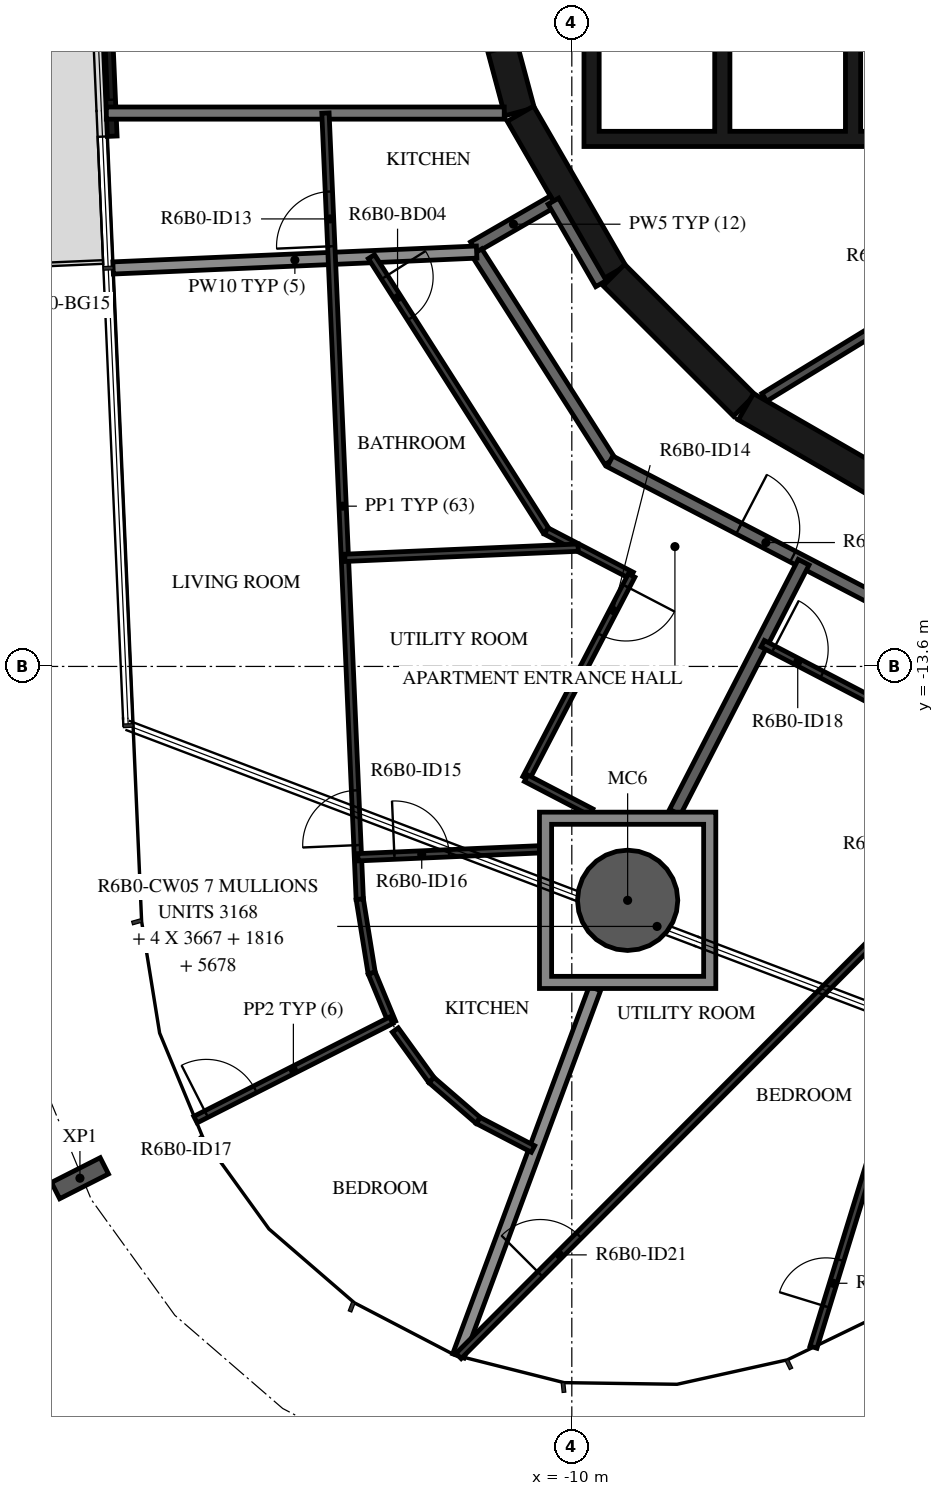
"""IFC4 building model, lengths in metres.
Left out: names, types, materials, properties, quantities, classifications, styles, units other than length and angle.
Written with IfcOpenShell. Run it as: python <this file> out.ifc"""

import sys

from ifc_helpers import new_model, si_unit, direction, frame, frame_2d, origin, origin_2d, place, context, subcontext, project, spatial, polyline, rectangle, hollow_circle, i_section, outline, extrude, element, fill, save


model = new_model("IFC4")
c1 = context("Model", 3, precision=1e-05, world=origin(), true_north=direction((0.0, 1.0)))
c2 = subcontext(c1, "Body", "Model", "MODEL_VIEW")
j1 = project(units=[si_unit("LENGTHUNIT", "METRE"), si_unit("PLANEANGLEUNIT", "RADIAN")], contexts=[c1])
p1 = place(None, origin())
s1 = spatial("IfcSite", under=j1, at=p1, CompositionType="ELEMENT")
p2 = place(p1, origin())
s2 = spatial("IfcBuilding", under=s1, at=p2, CompositionType="ELEMENT")
p3 = place(p2, frame((0.0, 0.0, 240.7)))
s3 = spatial("IfcBuildingStorey", under=s2, at=p3, CompositionType="ELEMENT", Elevation=240.7)
p4 = place(p3, frame((-9.082, -17.446, -0.38), z_axis=(0.0, 0.0, 1.0), x_axis=(1.0, 0.0, 0.0)))
e1 = element("IfcColumn", 1, at=p4, inside=s3, PredefinedType="COLUMN", context=c2, shape_type="SweptSolid", body=[
    extrude(hollow_circle(Radius=0.825, WallThickness=0.04, at=origin_2d()), origin(), (0.0, 0.0, 1.0), 3.5),
])
p5 = place(p3, frame((-18.089, -22.016, -0.38), z_axis=(0.0, 0.0, 1.0), x_axis=(-0.452473836659, 0.89177767809, 0.0)))
e2 = element("IfcColumn", 2, at=p5, inside=s3, PredefinedType="COLUMN", context=c2, shape_type="SweptSolid", body=[
    extrude(i_section(OverallWidth=0.3, OverallDepth=0.9, WebThickness=0.019, FlangeThickness=0.035, FilletRadius=0.03, at=origin_2d()), origin(), (0.0, 0.0, 1.0), 3.5),
])
p6 = place(p3, frame((-17.698, -1.684, 0.0), z_axis=(0.0, 0.0, 1.0), x_axis=(0.043639181999, -0.999047357133, 0.0)))
e3 = element("IfcWall", 3, at=p6, inside=s3, PredefinedType="STANDARD", context=c2, shape_type="SweptSolid", body=[
    extrude(rectangle(XDim=3.2, YDim=0.16, at=frame_2d((1.6, 0.0))), origin(), (0.0, 0.0, 1.0), 3.12),
])
p7 = place(p6, frame((0.2, 0.0, 0.0)))
e4 = element("IfcOpeningElement", 4, at=p7, cuts=e3, PredefinedType="OPENING", context=c2, shape_type="SweptSolid", body=[
    extrude(rectangle(XDim=2.4, YDim=2.4, at=frame_2d((1.2, 1.2))), frame((0.0, 0.09, 0.0), z_axis=(0.0, -1.0, 0.0), x_axis=(1.0, 0.0, 0.0)), (0.0, 0.0, 1.0), 0.18),
])
p8 = place(p3, frame((-11.643, -1.55, 0.0), z_axis=(0.0, 0.0, 1.0), x_axis=(0.258734743916, -0.965948410781, 0.0)))
e5 = element("IfcWall", 5, at=p8, inside=s3, PredefinedType="SHEAR", context=c2, shape_type="SweptSolid", body=[
    extrude(rectangle(XDim=3.033, YDim=0.5, at=frame_2d((1.516, 0.0))), origin(), (0.0, 0.0, 1.0), 3.12),
])
p9 = place(p8, frame((1.066, 0.0, 0.0)))
e6 = element("IfcOpeningElement", 6, at=p9, cuts=e5, PredefinedType="OPENING", context=c2, shape_type="SweptSolid", body=[
    extrude(rectangle(XDim=0.9, YDim=2.1, at=frame_2d((0.45, 1.05))), frame((0.0, 0.26, 0.0), z_axis=(0.0, -1.0, 0.0), x_axis=(1.0, 0.0, 0.0)), (0.0, 0.0, 1.0), 0.52),
])
p10 = place(p3, frame((-10.845, -4.51, 0.0), z_axis=(0.0, 0.0, 1.0), x_axis=(0.500087131594, -0.865975092491, 0.0)))
e7 = element("IfcWall", 7, at=p10, inside=s3, PredefinedType="SHEAR", context=c2, shape_type="SweptSolid", body=[
    extrude(rectangle(XDim=3.033, YDim=0.5, at=frame_2d((1.516, 0.0))), origin(), (0.0, 0.0, 1.0), 3.12),
])
p11 = place(p3, frame((-9.308, -7.164, 0.0), z_axis=(0.0, 0.0, 1.0), x_axis=(0.707106781187, -0.707106781187, 0.0)))
e8 = element("IfcWall", 8, at=p11, inside=s3, PredefinedType="SHEAR", context=c2, shape_type="SweptSolid", body=[
    extrude(rectangle(XDim=3.032, YDim=0.5, at=frame_2d((1.516, 0.0))), origin(), (0.0, 0.0, 1.0), 3.12),
])
p12 = place(p3, frame((-7.137, -9.329, 0.0), z_axis=(0.0, 0.0, 1.0), x_axis=(0.865975092491, -0.500087131594, 0.0)))
e9 = element("IfcWall", 9, at=p12, inside=s3, PredefinedType="SHEAR", context=c2, shape_type="SweptSolid", body=[
    extrude(rectangle(XDim=3.033, YDim=0.5, at=frame_2d((1.516, 0.0))), origin(), (0.0, 0.0, 1.0), 3.12),
])
p13 = place(p3, origin())
e10 = element("IfcWall", 10, at=p13, inside=s3, PredefinedType="SHEAR", context=c2, shape_type="SweptSolid", body=[
    extrude(outline(polyline([(9.8, -5.05), (9.8, -4.8), (9.8, -1.9), (9.55, -1.9), (9.55, -4.8), (7.65, -4.8), (7.65, -1.9), (7.4, -1.9), (7.4, -4.8), (5.5, -4.8), (5.5, -1.9), (5.25, -1.9), (5.25, -4.8), (3.35, -4.8), (3.35, -1.9), (3.1, -1.9), (3.1, -4.8), (1.2, -4.8), (1.2, -1.9), (0.95, -1.9), (0.95, -4.8), (-0.95, -4.8), (-0.95, -1.9), (-1.2, -1.9), (-1.2, -4.8), (-3.1, -4.8), (-3.1, -1.9), (-3.35, -1.9), (-3.35, -4.8), (-5.25, -4.8), (-5.25, -1.9), (-5.5, -1.9), (-5.5, -4.8), (-7.4, -4.8), (-7.4, -1.9), (-7.65, -1.9), (-7.65, -4.8), (-9.55, -4.8), (-9.55, -1.9), (-9.8, -1.9), (-9.8, -4.8), (-9.8, -5.05), (9.8, -5.05)])), origin(), (0.0, 0.0, 1.0), 3.12),
])
p14 = place(p3, frame((-2.451, -6.495, 0.0), z_axis=(0.0, 0.0, 1.0), x_axis=(-0.853250115418, -0.521501908471, 0.0)))
e11 = element("IfcWall", 11, at=p14, inside=s3, PredefinedType="PARTITIONING", context=c2, shape_type="SweptSolid", body=[
    extrude(rectangle(XDim=5.137, YDim=0.15, at=frame_2d((2.569, 0.0))), origin(), (0.0, 0.0, 1.0), 3.12),
])
p15 = place(p14, frame((2.119, 0.0, 0.0)))
e12 = element("IfcOpeningElement", 12, at=p15, cuts=e11, PredefinedType="OPENING", context=c2, shape_type="SweptSolid", body=[
    extrude(rectangle(XDim=0.9, YDim=2.1, at=frame_2d((0.45, 1.05))), frame((0.0, 0.085, 0.0), z_axis=(0.0, -1.0, 0.0), x_axis=(1.0, 0.0, 0.0)), (0.0, 0.0, 1.0), 0.17),
])
p16 = place(p3, frame((-10.303, -5.949, 0.0), z_axis=(0.0, 0.0, 1.0), x_axis=(-0.866043382451, -0.499968858743, 0.0)))
e13 = element("IfcWall", 13, at=p16, inside=s3, PredefinedType="STANDARD", context=c2, shape_type="SweptSolid", body=[
    extrude(rectangle(XDim=1.515, YDim=0.2, at=frame_2d((0.758, 0.0))), origin(), (0.0, 0.0, 1.0), 3.12),
])
p17 = place(p3, frame((-9.52, -7.305, 0.0), z_axis=(0.0, 0.0, 1.0), x_axis=(-0.500028278809, 0.866009076391, 0.0)))
e14 = element("IfcWall", 14, at=p17, inside=s3, PredefinedType="STANDARD", context=c2, shape_type="SweptSolid", body=[
    extrude(rectangle(XDim=1.566, YDim=0.2, at=frame_2d((0.783, 0.0))), origin(), (0.0, 0.0, 1.0), 3.12),
])
p18 = place(p3, frame((-11.565, -6.786, 0.0), z_axis=(0.0, 0.0, 1.0), x_axis=(0.537297327359, -0.843392898958, 0.0)))
e15 = element("IfcWall", 15, at=p18, inside=s3, PredefinedType="STANDARD", context=c2, shape_type="SweptSolid", body=[
    extrude(rectangle(XDim=4.081, YDim=0.2, at=frame_2d((2.041, 0.0))), origin(), (0.0, 0.0, 1.0), 3.12),
])
p19 = place(p3, frame((-9.372, -10.228, 0.0), z_axis=(0.0, 0.0, 1.0), x_axis=(0.887005184532, -0.461759464021, 0.0)))
e16 = element("IfcWall", 16, at=p19, inside=s3, PredefinedType="STANDARD", context=c2, shape_type="SweptSolid", body=[
    extrude(rectangle(XDim=7.181, YDim=0.2, at=frame_2d((3.591, 0.0))), origin(), (0.0, 0.0, 1.0), 3.12),
])
p20 = place(p19, frame((2.391, 0.0, 0.0)))
e17 = element("IfcOpeningElement", 17, at=p20, cuts=e16, PredefinedType="OPENING", context=c2, shape_type="SweptSolid", body=[
    extrude(rectangle(XDim=1.0, YDim=2.1, at=frame_2d((0.5, 1.05))), frame((0.0, 0.11, 0.0), z_axis=(0.0, -1.0, 0.0), x_axis=(1.0, 0.0, 0.0)), (0.0, 0.0, 1.0), 0.22),
])
p21 = place(p3, frame((-17.655, -4.5, 0.0), z_axis=(0.0, 0.0, 1.0), x_axis=(1.0, 0.0, 0.0)))
e18 = element("IfcWall", 18, at=p21, inside=s3, PredefinedType="STANDARD", context=c2, shape_type="SweptSolid", body=[
    extrude(rectangle(XDim=6.543, YDim=0.2, at=frame_2d((3.272, 0.0))), origin(), (0.0, 0.0, 1.0), 3.12),
])
p22 = place(p3, frame((-17.544, -7.047, 0.0), z_axis=(0.0, 0.0, 1.0), x_axis=(0.999046743906, 0.043653218555, 0.0)))
e19 = element("IfcWall", 19, at=p22, inside=s3, PredefinedType="STANDARD", context=c2, shape_type="SweptSolid", body=[
    extrude(rectangle(XDim=5.984, YDim=0.2, at=frame_2d((2.992, 0.0))), origin(), (0.0, 0.0, 1.0), 2.73),
])
p23 = place(p3, frame((-8.303, -15.996, 0.0), z_axis=(0.0, 0.0, 1.0), x_axis=(0.457702371186, 0.889105471477, 0.0)))
e20 = element("IfcWall", 20, at=p23, inside=s3, PredefinedType="STANDARD", context=c2, shape_type="SweptSolid", body=[
    extrude(rectangle(XDim=4.623, YDim=0.2, at=frame_2d((2.312, 0.0))), origin(), (0.0, 0.0, 1.0), 3.12),
])
p24 = place(p3, frame((-11.865, -24.939, 0.0), z_axis=(0.0, 0.0, 1.0), x_axis=(0.348245485283, 0.937403372076, 0.0)))
e21 = element("IfcWall", 21, at=p24, inside=s3, PredefinedType="STANDARD", context=c2, shape_type="SweptSolid", body=[
    extrude(rectangle(XDim=6.446, YDim=0.2, at=frame_2d((3.223, 0.0))), origin(), (0.0, 0.0, 1.0), 2.73),
])
p25 = place(p3, frame((-13.487, -17.429, 0.0), z_axis=(0.0, 0.0, 1.0), x_axis=(-0.043617336945, 0.999048311103, 0.0)))
e22 = element("IfcWall", 22, at=p25, inside=s3, PredefinedType="PARTITIONING", context=c2, shape_type="SweptSolid", body=[
    extrude(rectangle(XDim=12.941, YDim=0.12, at=frame_2d((6.47, 0.0))), origin(), (0.0, 0.0, 1.0), 3.12),
])
p26 = place(p25, frame((10.749, 0.0, 0.0)))
e23 = element("IfcOpeningElement", 23, at=p26, cuts=e22, PredefinedType="OPENING", context=c2, shape_type="SweptSolid", body=[
    extrude(rectangle(XDim=0.9, YDim=2.1, at=frame_2d((0.45, 1.05))), frame((0.0, 0.07, 0.0), z_axis=(0.0, -1.0, 0.0), x_axis=(1.0, 0.0, 0.0)), (0.0, 0.0, 1.0), 0.14),
])
p27 = place(p25, frame((0.892, 0.0, 0.0)))
e24 = element("IfcOpeningElement", 24, at=p27, cuts=e22, PredefinedType="OPENING", context=c2, shape_type="SweptSolid", body=[
    extrude(rectangle(XDim=0.9, YDim=2.1, at=frame_2d((0.45, 1.05))), frame((0.0, 0.07, 0.0), z_axis=(0.0, -1.0, 0.0), x_axis=(1.0, 0.0, 0.0)), (0.0, 0.0, 1.0), 0.14),
])
p28 = place(p3, frame((-13.295, -6.862, 0.0), z_axis=(0.0, 0.0, 1.0), x_axis=(0.537285929223, -0.84340016022, 0.0)))
e25 = element("IfcWall", 25, at=p28, inside=s3, PredefinedType="PARTITIONING", context=c2, shape_type="SweptSolid", body=[
    extrude(rectangle(XDim=5.349, YDim=0.12, at=frame_2d((2.675, 0.0))), origin(), (0.0, 0.0, 1.0), 3.12),
])
p29 = place(p28, frame((0.4, 0.0, 0.0)))
e26 = element("IfcOpeningElement", 26, at=p29, cuts=e25, PredefinedType="OPENING", context=c2, shape_type="SweptSolid", body=[
    extrude(rectangle(XDim=0.8, YDim=2.1, at=frame_2d((0.4, 1.05))), frame((0.0, 0.07, 0.0), z_axis=(0.0, -1.0, 0.0), x_axis=(1.0, 0.0, 0.0)), (0.0, 0.0, 1.0), 0.14),
])
p30 = place(p3, frame((-10.421, -11.373, 0.0), z_axis=(0.0, 0.0, 1.0), x_axis=(0.887065333052, -0.461643904864, 0.0)))
e27 = element("IfcWall", 27, at=p30, inside=s3, PredefinedType="PARTITIONING", context=c2, shape_type="SweptSolid", body=[
    extrude(rectangle(XDim=1.584, YDim=0.12, at=frame_2d((0.792, 0.0))), origin(), (0.0, 0.0, 1.0), 3.12),
])
p31 = place(p3, frame((-9.016, -12.104, 0.0), z_axis=(0.0, 0.0, 1.0), x_axis=(-0.4617534789, -0.887008300256, 0.0)))
e28 = element("IfcWall", 28, at=p31, inside=s3, PredefinedType="PARTITIONING", context=c2, shape_type="SweptSolid", body=[
    extrude(rectangle(XDim=3.759, YDim=0.12, at=frame_2d((1.88, 0.0))), origin(), (0.0, 0.0, 1.0), 3.12),
])
p32 = place(p31, frame((0.2, 0.0, 0.0)))
e29 = element("IfcOpeningElement", 29, at=p32, cuts=e28, PredefinedType="OPENING", context=c2, shape_type="SweptSolid", body=[
    extrude(rectangle(XDim=0.9, YDim=2.1, at=frame_2d((0.45, 1.05))), frame((0.0, 0.07, 0.0), z_axis=(0.0, -1.0, 0.0), x_axis=(1.0, 0.0, 0.0)), (0.0, 0.0, 1.0), 0.14),
])
p33 = place(p3, frame((-10.752, -15.439, 0.0), z_axis=(0.0, 0.0, 1.0), x_axis=(0.887031383626, -0.461709134048, 0.0)))
e30 = element("IfcWall", 30, at=p33, inside=s3, PredefinedType="PARTITIONING", context=c2, shape_type="SweptSolid", body=[
    extrude(rectangle(XDim=1.208, YDim=0.12, at=frame_2d((0.604, 0.0))), origin(), (0.0, 0.0, 1.0), 3.12),
])
p34 = place(p3, frame((-13.732, -11.814, 0.0), z_axis=(0.0, 0.0, 1.0), x_axis=(0.999048344587, 0.043616569999, 0.0)))
e31 = element("IfcWall", 31, at=p34, inside=s3, PredefinedType="PARTITIONING", context=c2, shape_type="SweptSolid", body=[
    extrude(rectangle(XDim=3.84, YDim=0.12, at=frame_2d((1.92, 0.0))), origin(), (0.0, 0.0, 1.0), 3.12),
])
p35 = place(p3, frame((-12.954, -19.456, 0.0), z_axis=(0.0, 0.0, 1.0), x_axis=(-0.382807777256, 0.923828017367, 0.0)))
e32 = element("IfcWall", 32, at=p35, inside=s3, PredefinedType="PARTITIONING", context=c2, shape_type="SweptSolid", body=[
    extrude(rectangle(XDim=0.883, YDim=0.12, at=frame_2d((0.441, 0.0))), origin(), (0.0, 0.0, 1.0), 3.12),
])
p36 = place(p3, frame((-13.292, -18.64, 0.0), z_axis=(0.0, 0.0, 1.0), x_axis=(-0.159363796836, 0.98721992497, 0.0)))
e33 = element("IfcWall", 33, at=p36, inside=s3, PredefinedType="PARTITIONING", context=c2, shape_type="SweptSolid", body=[
    extrude(rectangle(XDim=1.227, YDim=0.12, at=frame_2d((0.614, 0.0))), origin(), (0.0, 0.0, 1.0), 3.12),
])
p37 = place(p3, frame((-16.189, -21.052, 0.0), z_axis=(0.0, 0.0, 1.0), x_axis=(0.891801938239, 0.452426019316, 0.0)))
e34 = element("IfcWall", 34, at=p37, inside=s3, PredefinedType="PARTITIONING", context=c2, shape_type="SweptSolid", body=[
    extrude(rectangle(XDim=3.611, YDim=0.12, at=frame_2d((1.805, 0.0))), origin(), (0.0, 0.0, 1.0), 2.73),
])
p38 = place(p37, frame((0.2, 0.0, 0.0)))
e35 = element("IfcOpeningElement", 35, at=p38, cuts=e34, PredefinedType="OPENING", context=c2, shape_type="SweptSolid", body=[
    extrude(rectangle(XDim=0.9, YDim=2.1, at=frame_2d((0.45, 1.05))), frame((0.0, 0.07, 0.0), z_axis=(0.0, -1.0, 0.0), x_axis=(1.0, 0.0, 0.0)), (0.0, 0.0, 1.0), 0.14),
])
p39 = place(p3, frame((-13.517, -16.738, 0.0), z_axis=(0.0, 0.0, 1.0), x_axis=(0.999047660155, 0.043632244256, 0.0)))
e36 = element("IfcWall", 36, at=p39, inside=s3, PredefinedType="PARTITIONING", context=c2, shape_type="SweptSolid", body=[
    extrude(rectangle(XDim=2.988, YDim=0.12, at=frame_2d((1.494, 0.0))), origin(), (0.0, 0.0, 1.0), 3.12),
])
p40 = place(p39, frame((0.6, 0.0, 0.0)))
e37 = element("IfcOpeningElement", 37, at=p40, cuts=e36, PredefinedType="OPENING", context=c2, shape_type="SweptSolid", body=[
    extrude(rectangle(XDim=0.9, YDim=2.1, at=frame_2d((0.45, 1.05))), frame((0.0, 0.07, 0.0), z_axis=(0.0, -1.0, 0.0), x_axis=(1.0, 0.0, 0.0)), (0.0, 0.0, 1.0), 0.14),
])
for number, where, z_axis, x_axis in (
    (38, (-12.903, -19.579, 0.0), (0.0, 0.0, 1.0), (0.585, -0.811, 0.0)),
    (39, (-12.308, -20.402, 0.0), (0.0, 0.0, 1.0), (0.757, -0.654, 0.0)),
    (40, (-11.539, -21.067, 0.0), (0.0, 0.0, 1.0), (0.887, -0.462, 0.0)),
):
    element("IfcWall", number, at=place(p3, frame(where, z_axis=z_axis, x_axis=x_axis)), inside=s3, PredefinedType="PARTITIONING", context=c2, shape_type="SweptSolid", body=[
        extrude(rectangle(XDim=1.016, YDim=0.12, at=frame_2d((0.508, 0.0))), origin(), (0.0, 0.0, 1.0), 3.12),
    ])
p41 = place(p3, frame((-6.861, -13.226, 0.0), z_axis=(0.0, 0.0, 1.0), x_axis=(0.887010791097, -0.461748694073, 0.0)))
e41 = element("IfcWall", 41, at=p41, inside=s3, PredefinedType="PARTITIONING", context=c2, shape_type="SweptSolid", body=[
    extrude(rectangle(XDim=3.727, YDim=0.12, at=frame_2d((1.864, 0.0))), origin(), (0.0, 0.0, 1.0), 3.12),
])
p42 = place(p41, frame((0.2, 0.0, 0.0)))
e42 = element("IfcOpeningElement", 42, at=p42, cuts=e41, PredefinedType="OPENING", context=c2, shape_type="SweptSolid", body=[
    extrude(rectangle(XDim=0.9, YDim=2.1, at=frame_2d((0.45, 1.05))), frame((0.0, 0.07, 0.0), z_axis=(0.0, -1.0, 0.0), x_axis=(1.0, 0.0, 0.0)), (0.0, 0.0, 1.0), 0.14),
])
p43 = place(p3, frame((-11.862, -24.94, 0.0), z_axis=(0.0, 0.0, 1.0), x_axis=(0.70663293894, 0.707580306117, 0.0)))
e43 = element("IfcWall", 43, at=p43, inside=s3, PredefinedType="PARTITIONING", context=c2, shape_type="SweptSolid", body=[
    extrude(rectangle(XDim=11.854, YDim=0.12, at=frame_2d((5.927, 0.0))), origin(), (0.0, 0.0, 1.0), 3.12),
])
p44 = place(p43, frame((1.9, 0.0, 0.0)))
e44 = element("IfcOpeningElement", 44, at=p44, cuts=e43, PredefinedType="OPENING", context=c2, shape_type="SweptSolid", body=[
    extrude(rectangle(XDim=0.9, YDim=2.1, at=frame_2d((0.45, 1.05))), frame((0.0, 0.07, 0.0), z_axis=(0.0, -1.0, 0.0), x_axis=(1.0, 0.0, 0.0)), (0.0, 0.0, 1.0), 0.14),
])
p45 = place(p3, frame((-6.026, -24.795, 0.0), z_axis=(0.0, 0.0, 1.0), x_axis=(0.294501505058, 0.955651015548, 0.0)))
e45 = element("IfcWall", 45, at=p45, inside=s3, PredefinedType="PARTITIONING", context=c2, shape_type="SweptSolid", body=[
    extrude(rectangle(XDim=8.626, YDim=0.12, at=frame_2d((4.313, 0.0))), origin(), (0.0, 0.0, 1.0), 3.12),
])
p46 = place(p45, frame((0.7, 0.0, 0.0)))
e46 = element("IfcOpeningElement", 46, at=p46, cuts=e45, PredefinedType="OPENING", context=c2, shape_type="SweptSolid", body=[
    extrude(rectangle(XDim=0.8, YDim=2.1, at=frame_2d((0.4, 1.05))), frame((0.0, 0.07, 0.0), z_axis=(0.0, -1.0, 0.0), x_axis=(1.0, 0.0, 0.0)), (0.0, 0.0, 1.0), 0.14),
])
p47 = place(p3, origin())
e47 = element("IfcWall", 47, at=p47, inside=s3, PredefinedType="STANDARD", context=c2, shape_type="SweptSolid", body=[
    extrude(outline(polyline([(-7.632, -15.996), (-7.632, -18.896), (-10.532, -18.896), (-10.532, -15.996), (-7.632, -15.996)]), holes=[polyline([(-10.332, -18.696), (-7.832, -18.696), (-7.832, -16.196), (-10.332, -16.196), (-10.332, -18.696)])]), origin(), (0.0, 0.0, 1.0), 3.12),
])
p48 = place(p7, origin())
e48 = element("IfcDoor", 48, at=p48, inside=s3, OperationType="DOUBLE_DOOR_SLIDING", PredefinedType="DOOR", context=c2, shape_type="SweptSolid", body=[
    extrude(rectangle(XDim=2.4, YDim=2.4, at=frame_2d((1.2, 1.2))), frame((0.0, 0.025, 0.0), z_axis=(0.0, -1.0, 0.0), x_axis=(1.0, 0.0, 0.0)), (0.0, 0.0, 1.0), 0.05),
])
fill(e4, e48)
p49 = place(p26, origin())
e49 = element("IfcDoor", 49, at=p49, inside=s3, OperationType="SINGLE_SWING_LEFT", PredefinedType="DOOR", context=c2, shape_type="SweptSolid", body=[
    extrude(rectangle(XDim=0.9, YDim=2.1, at=frame_2d((0.45, 1.05))), frame((0.0, 0.025, 0.0), z_axis=(0.0, -1.0, 0.0), x_axis=(1.0, 0.0, 0.0)), (0.0, 0.0, 1.0), 0.05),
])
fill(e23, e49)
p50 = place(p20, origin())
e50 = element("IfcDoor", 50, at=p50, inside=s3, OperationType="SINGLE_SWING_RIGHT", PredefinedType="DOOR", context=c2, shape_type="SweptSolid", body=[
    extrude(rectangle(XDim=1.0, YDim=2.1, at=frame_2d((0.5, 1.05))), frame((0.0, 0.025, 0.0), z_axis=(0.0, -1.0, 0.0), x_axis=(1.0, 0.0, 0.0)), (0.0, 0.0, 1.0), 0.05),
])
fill(e17, e50)
p51 = place(p29, origin())
e51 = element("IfcDoor", 51, at=p51, inside=s3, OperationType="SINGLE_SWING_RIGHT", PredefinedType="DOOR", context=c2, shape_type="SweptSolid", body=[
    extrude(rectangle(XDim=0.8, YDim=2.1, at=frame_2d((0.4, 1.05))), frame((0.0, 0.025, 0.0), z_axis=(0.0, -1.0, 0.0), x_axis=(1.0, 0.0, 0.0)), (0.0, 0.0, 1.0), 0.05),
])
fill(e26, e51)
p52 = place(p32, origin())
e52 = element("IfcDoor", 52, at=p52, inside=s3, OperationType="SINGLE_SWING_RIGHT", PredefinedType="DOOR", context=c2, shape_type="SweptSolid", body=[
    extrude(rectangle(XDim=0.9, YDim=2.1, at=frame_2d((0.45, 1.05))), frame((0.0, 0.025, 0.0), z_axis=(0.0, -1.0, 0.0), x_axis=(1.0, 0.0, 0.0)), (0.0, 0.0, 1.0), 0.05),
])
fill(e29, e52)
p53 = place(p27, origin())
e53 = element("IfcDoor", 53, at=p53, inside=s3, OperationType="SINGLE_SWING_RIGHT", PredefinedType="DOOR", context=c2, shape_type="SweptSolid", body=[
    extrude(rectangle(XDim=0.9, YDim=2.1, at=frame_2d((0.45, 1.05))), frame((0.0, 0.025, 0.0), z_axis=(0.0, -1.0, 0.0), x_axis=(1.0, 0.0, 0.0)), (0.0, 0.0, 1.0), 0.05),
])
fill(e24, e53)
p54 = place(p40, origin())
e54 = element("IfcDoor", 54, at=p54, inside=s3, OperationType="SINGLE_SWING_RIGHT", PredefinedType="DOOR", context=c2, shape_type="SweptSolid", body=[
    extrude(rectangle(XDim=0.9, YDim=2.1, at=frame_2d((0.45, 1.05))), frame((0.0, 0.025, 0.0), z_axis=(0.0, -1.0, 0.0), x_axis=(1.0, 0.0, 0.0)), (0.0, 0.0, 1.0), 0.05),
])
fill(e37, e54)
p55 = place(p38, origin())
e55 = element("IfcDoor", 55, at=p55, inside=s3, OperationType="SINGLE_SWING_RIGHT", PredefinedType="DOOR", context=c2, shape_type="SweptSolid", body=[
    extrude(rectangle(XDim=0.9, YDim=2.1, at=frame_2d((0.45, 1.05))), frame((0.0, 0.025, 0.0), z_axis=(0.0, -1.0, 0.0), x_axis=(1.0, 0.0, 0.0)), (0.0, 0.0, 1.0), 0.05),
])
fill(e35, e55)
p56 = place(p42, origin())
e56 = element("IfcDoor", 56, at=p56, inside=s3, OperationType="SINGLE_SWING_LEFT", PredefinedType="DOOR", context=c2, shape_type="SweptSolid", body=[
    extrude(rectangle(XDim=0.9, YDim=2.1, at=frame_2d((0.45, 1.05))), frame((0.0, 0.025, 0.0), z_axis=(0.0, -1.0, 0.0), x_axis=(1.0, 0.0, 0.0)), (0.0, 0.0, 1.0), 0.05),
])
fill(e42, e56)
p57 = place(p44, origin())
e57 = element("IfcDoor", 57, at=p57, inside=s3, OperationType="SINGLE_SWING_RIGHT", PredefinedType="DOOR", context=c2, shape_type="SweptSolid", body=[
    extrude(rectangle(XDim=0.9, YDim=2.1, at=frame_2d((0.45, 1.05))), frame((0.0, 0.025, 0.0), z_axis=(0.0, -1.0, 0.0), x_axis=(1.0, 0.0, 0.0)), (0.0, 0.0, 1.0), 0.05),
])
fill(e44, e57)
p58 = place(p46, origin())
e58 = element("IfcDoor", 58, at=p58, inside=s3, OperationType="SINGLE_SWING_RIGHT", PredefinedType="DOOR", context=c2, shape_type="SweptSolid", body=[
    extrude(rectangle(XDim=0.8, YDim=2.1, at=frame_2d((0.4, 1.05))), frame((0.0, 0.025, 0.0), z_axis=(0.0, -1.0, 0.0), x_axis=(1.0, 0.0, 0.0)), (0.0, 0.0, 1.0), 0.05),
])
fill(e46, e58)
save(model, sys.argv[1])
